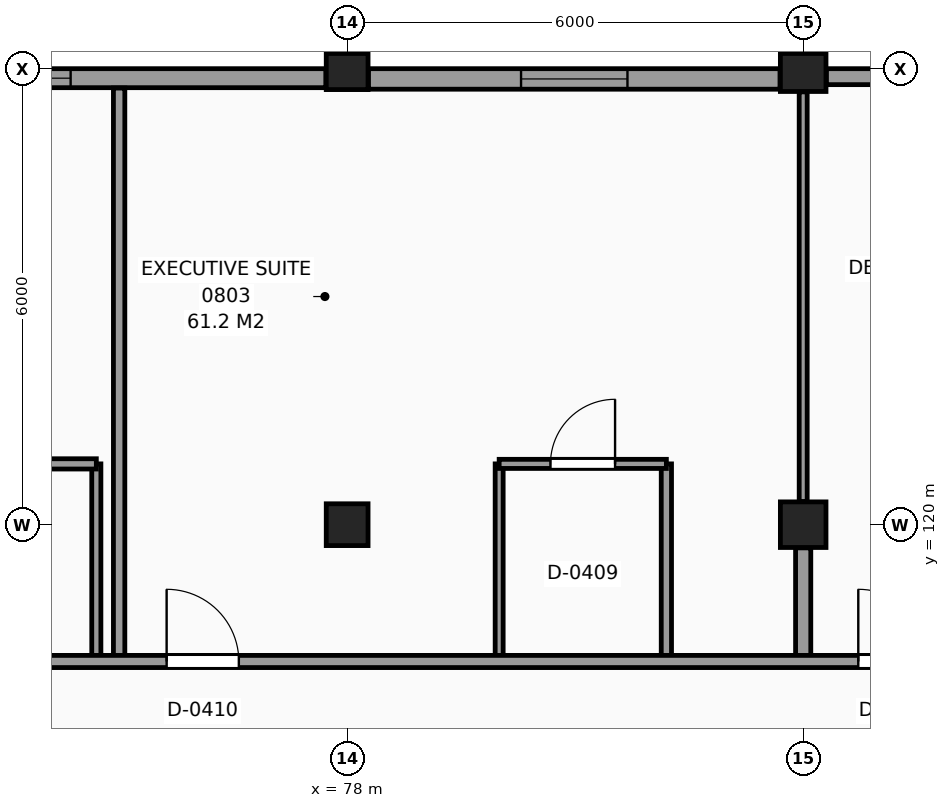
"""IFC4 building model, lengths in metres.
Left out: names, types, materials, properties, quantities, classifications, styles, units other than length and angle.
Written with IfcOpenShell. Run it as: python <this file> out.ifc"""

import sys

from ifc_helpers import new_model, si_unit, direction, frame, frame_2d, origin, origin_2d, place, context, subcontext, project, spatial, rectangle, extrude, element, fill, save


model = new_model("IFC4")
c1 = context("Model", 3, precision=1e-05, world=origin(), true_north=direction((0.0, 1.0)))
c2 = subcontext(c1, "Body", "Model", "MODEL_VIEW")
j1 = project(units=[si_unit("LENGTHUNIT", "METRE"), si_unit("PLANEANGLEUNIT", "RADIAN")], contexts=[c1])
p1 = place(None, origin())
s1 = spatial("IfcSite", under=j1, at=p1, CompositionType="ELEMENT")
p2 = place(p1, origin())
s2 = spatial("IfcBuilding", under=s1, at=p2, CompositionType="ELEMENT")
p3 = place(p2, frame((0.0, 0.0, 34.8)))
s3 = spatial("IfcBuildingStorey", under=s2, at=p3, CompositionType="ELEMENT", Elevation=34.8)
for number, where, z_axis, x_axis in (
    (1, (78.0, 120.0, 0.0), (0.0, 0.0, 1.0), (1.0, 0.0, 0.0)),
    (2, (78.0, 126.0, 0.0), (0.0, 0.0, 1.0), (1.0, 0.0, 0.0)),
):
    element("IfcColumn", number, at=place(p3, frame(where, z_axis=z_axis, x_axis=x_axis)), inside=s3, PredefinedType="COLUMN", context=c2, shape_type="SweptSolid", body=[
        extrude(rectangle(XDim=0.55, YDim=0.55, at=origin_2d()), origin(), (0.0, 0.0, 1.0), 3.3),
    ])
for number, where, z_axis, x_axis in (
    (3, (84.0, 120.0, 0.0), (0.0, 0.0, 1.0), (1.0, 0.0, 0.0)),
    (4, (84.0, 126.0, 0.0), (0.0, 0.0, 1.0), (1.0, 0.0, 0.0)),
):
    element("IfcColumn", number, at=place(p3, frame(where, z_axis=z_axis, x_axis=x_axis)), inside=s3, PredefinedType="COLUMN", context=c2, shape_type="SweptSolid", body=[
        extrude(rectangle(XDim=0.6, YDim=0.6, at=origin_2d()), origin(), (0.0, 0.0, 1.0), 3.3),
    ])
p4 = place(p3, frame((89.72, 125.895, 0.0), z_axis=(0.0, 0.0, 1.0), x_axis=(-1.0, 0.0, 0.0)))
e5 = element("IfcWall", 5, at=p4, inside=s3, PredefinedType="SOLIDWALL", context=c2, shape_type="SweptSolid", body=[
    extrude(rectangle(XDim=5.415, YDim=0.21, at=frame_2d((2.708, 0.0))), origin(), (0.0, 0.0, 1.0), 2.445),
])
p5 = place(p4, frame((2.608, 0.0, 0.8)))
e6 = element("IfcOpeningElement", 6, at=p5, cuts=e5, PredefinedType="OPENING", context=c2, shape_type="SweptSolid", body=[
    extrude(rectangle(XDim=1.4, YDim=1.4, at=frame_2d((0.7, 0.7))), frame((0.0, 0.115, 0.0), z_axis=(0.0, -1.0, 0.0), x_axis=(1.0, 0.0, 0.0)), (0.0, 0.0, 1.0), 0.23),
])
p6 = place(p3, frame((83.695, 125.865, 0.0), z_axis=(0.0, 0.0, 1.0), x_axis=(-1.0, 0.0, 0.0)))
e7 = element("IfcWall", 7, at=p6, inside=s3, PredefinedType="SOLIDWALL", context=c2, shape_type="SweptSolid", body=[
    extrude(rectangle(XDim=5.415, YDim=0.27, at=frame_2d((2.708, 0.0))), origin(), (0.0, 0.0, 1.0), 2.445),
])
p7 = place(p6, frame((2.007, 0.0, 0.8)))
e8 = element("IfcOpeningElement", 8, at=p7, cuts=e7, PredefinedType="OPENING", context=c2, shape_type="SweptSolid", body=[
    extrude(rectangle(XDim=1.4, YDim=1.4, at=frame_2d((0.7, 0.7))), frame((0.0, 0.145, 0.0), z_axis=(0.0, -1.0, 0.0), x_axis=(1.0, 0.0, 0.0)), (0.0, 0.0, 1.0), 0.29),
])
p8 = place(p3, frame((77.72, 125.875, 0.0), z_axis=(0.0, 0.0, 1.0), x_axis=(-1.0, 0.0, 0.0)))
e9 = element("IfcWall", 9, at=p8, inside=s3, PredefinedType="SOLIDWALL", context=c2, shape_type="SweptSolid", body=[
    extrude(rectangle(XDim=5.415, YDim=0.25, at=frame_2d((2.708, 0.0))), origin(), (0.0, 0.0, 1.0), 2.445),
])
p9 = place(p8, frame((3.358, 0.0, 0.8)))
e10 = element("IfcOpeningElement", 10, at=p9, cuts=e9, PredefinedType="OPENING", context=c2, shape_type="SweptSolid", body=[
    extrude(rectangle(XDim=1.4, YDim=1.4, at=frame_2d((0.7, 0.7))), frame((0.0, 0.135, 0.0), z_axis=(0.0, -1.0, 0.0), x_axis=(1.0, 0.0, 0.0)), (0.0, 0.0, 1.0), 0.27),
])
p10 = place(p3, frame((74.7, 118.2, 0.0), z_axis=(0.0, 0.0, 1.0), x_axis=(0.0, 1.0, 0.0)))
e11 = element("IfcWall", 11, at=p10, inside=s3, PredefinedType="PARTITIONING", context=c2, shape_type="SweptSolid", body=[
    extrude(rectangle(XDim=2.6, YDim=0.12, at=frame_2d((1.3, 0.0))), origin(), (0.0, 0.0, 1.0), 3.07),
])
p11 = place(p3, frame((75.0, 118.2, 0.0), z_axis=(0.0, 0.0, 1.0), x_axis=(0.0, 1.0, 0.0)))
e12 = element("IfcWall", 12, at=p11, inside=s3, PredefinedType="PARTITIONING", context=c2, shape_type="SweptSolid", body=[
    extrude(rectangle(XDim=7.545, YDim=0.15, at=frame_2d((3.772, 0.0))), origin(), (0.0, 0.0, 1.0), 3.07),
])
p12 = place(p3, frame((80.0, 118.2, 0.0), z_axis=(0.0, 0.0, 1.0), x_axis=(0.0, 1.0, 0.0)))
e13 = element("IfcWall", 13, at=p12, inside=s3, PredefinedType="PARTITIONING", context=c2, shape_type="SweptSolid", body=[
    extrude(rectangle(XDim=2.6, YDim=0.105, at=frame_2d((1.3, 0.0))), origin(), (0.0, 0.0, 1.0), 3.07),
])
p13 = place(p3, frame((82.2, 118.2, 0.0), z_axis=(0.0, 0.0, 1.0), x_axis=(0.0, 1.0, 0.0)))
e14 = element("IfcWall", 14, at=p13, inside=s3, PredefinedType="PARTITIONING", context=c2, shape_type="SweptSolid", body=[
    extrude(rectangle(XDim=2.6, YDim=0.135, at=frame_2d((1.3, 0.0))), origin(), (0.0, 0.0, 1.0), 3.07),
])
p14 = place(p3, frame((84.0, 118.2, 0.0), z_axis=(0.0, 0.0, 1.0), x_axis=(0.0, 1.0, 0.0)))
e15 = element("IfcWall", 15, at=p14, inside=s3, PredefinedType="PARTITIONING", context=c2, shape_type="SweptSolid", body=[
    extrude(rectangle(XDim=1.495, YDim=0.2, at=frame_2d((0.748, 0.0))), origin(), (0.0, 0.0, 1.0), 2.295),
])
p15 = place(p3, frame((84.0, 120.305, 0.0), z_axis=(0.0, 0.0, 1.0), x_axis=(0.0, 1.0, 0.0)))
e16 = element("IfcWall", 16, at=p15, inside=s3, PredefinedType="PARTITIONING", context=c2, shape_type="SweptSolid", body=[
    extrude(rectangle(XDim=5.39, YDim=0.105, at=frame_2d((2.695, 0.0))), origin(), (0.0, 0.0, 1.0), 2.295),
])
p16 = place(p3, frame((66.275, 118.2, 0.0), z_axis=(0.0, 0.0, 1.0), x_axis=(1.0, 0.0, 0.0)))
e17 = element("IfcWall", 17, at=p16, inside=s3, PredefinedType="PARTITIONING", context=c2, shape_type="SweptSolid", body=[
    extrude(rectangle(XDim=110.225, YDim=0.16, at=frame_2d((55.113, 0.0))), origin(), (0.0, 0.0, 1.0), 3.07),
])
p17 = place(p16, frame((0.45, 0.0, 0.0)))
e18 = element("IfcOpeningElement", 18, at=p17, cuts=e17, PredefinedType="OPENING", context=c2, shape_type="SweptSolid", body=[
    extrude(rectangle(XDim=0.95, YDim=2.1, at=frame_2d((0.475, 1.05))), frame((0.0, 0.09, 0.0), z_axis=(0.0, -1.0, 0.0), x_axis=(1.0, 0.0, 0.0)), (0.0, 0.0, 1.0), 0.18),
])
p18 = place(p16, frame((4.85, 0.0, 0.0)))
e19 = element("IfcOpeningElement", 19, at=p18, cuts=e17, PredefinedType="OPENING", context=c2, shape_type="SweptSolid", body=[
    extrude(rectangle(XDim=0.95, YDim=2.1, at=frame_2d((0.475, 1.05))), frame((0.0, 0.09, 0.0), z_axis=(0.0, -1.0, 0.0), x_axis=(1.0, 0.0, 0.0)), (0.0, 0.0, 1.0), 0.18),
])
p19 = place(p16, frame((9.35, 0.0, 0.0)))
e20 = element("IfcOpeningElement", 20, at=p19, cuts=e17, PredefinedType="OPENING", context=c2, shape_type="SweptSolid", body=[
    extrude(rectangle(XDim=0.95, YDim=2.1, at=frame_2d((0.475, 1.05))), frame((0.0, 0.09, 0.0), z_axis=(0.0, -1.0, 0.0), x_axis=(1.0, 0.0, 0.0)), (0.0, 0.0, 1.0), 0.18),
])
p20 = place(p16, frame((18.45, 0.0, 0.0)))
e21 = element("IfcOpeningElement", 21, at=p20, cuts=e17, PredefinedType="OPENING", context=c2, shape_type="SweptSolid", body=[
    extrude(rectangle(XDim=0.95, YDim=2.1, at=frame_2d((0.475, 1.05))), frame((0.0, 0.09, 0.0), z_axis=(0.0, -1.0, 0.0), x_axis=(1.0, 0.0, 0.0)), (0.0, 0.0, 1.0), 0.18),
])
p21 = place(p16, frame((22.85, 0.0, 0.0)))
e22 = element("IfcOpeningElement", 22, at=p21, cuts=e17, PredefinedType="OPENING", context=c2, shape_type="SweptSolid", body=[
    extrude(rectangle(XDim=0.95, YDim=2.1, at=frame_2d((0.475, 1.05))), frame((0.0, 0.09, 0.0), z_axis=(0.0, -1.0, 0.0), x_axis=(1.0, 0.0, 0.0)), (0.0, 0.0, 1.0), 0.18),
])
p22 = place(p16, frame((27.35, 0.0, 0.0)))
e23 = element("IfcOpeningElement", 23, at=p22, cuts=e17, PredefinedType="OPENING", context=c2, shape_type="SweptSolid", body=[
    extrude(rectangle(XDim=0.95, YDim=2.1, at=frame_2d((0.475, 1.05))), frame((0.0, 0.09, 0.0), z_axis=(0.0, -1.0, 0.0), x_axis=(1.0, 0.0, 0.0)), (0.0, 0.0, 1.0), 0.18),
])
p23 = place(p16, frame((42.05, 0.0, 0.0)))
e24 = element("IfcOpeningElement", 24, at=p23, cuts=e17, PredefinedType="OPENING", context=c2, shape_type="SweptSolid", body=[
    extrude(rectangle(XDim=0.95, YDim=2.1, at=frame_2d((0.475, 1.05))), frame((0.0, 0.09, 0.0), z_axis=(0.0, -1.0, 0.0), x_axis=(1.0, 0.0, 0.0)), (0.0, 0.0, 1.0), 0.18),
])
p24 = place(p16, frame((50.3, 0.0, 0.0)))
e25 = element("IfcOpeningElement", 25, at=p24, cuts=e17, PredefinedType="OPENING", context=c2, shape_type="SweptSolid", body=[
    extrude(rectangle(XDim=0.95, YDim=2.1, at=frame_2d((0.475, 1.05))), frame((0.0, 0.09, 0.0), z_axis=(0.0, -1.0, 0.0), x_axis=(1.0, 0.0, 0.0)), (0.0, 0.0, 1.0), 0.18),
])
p25 = place(p16, frame((52.85, 0.0, 0.0)))
e26 = element("IfcOpeningElement", 26, at=p25, cuts=e17, PredefinedType="OPENING", context=c2, shape_type="SweptSolid", body=[
    extrude(rectangle(XDim=0.95, YDim=2.1, at=frame_2d((0.475, 1.05))), frame((0.0, 0.09, 0.0), z_axis=(0.0, -1.0, 0.0), x_axis=(1.0, 0.0, 0.0)), (0.0, 0.0, 1.0), 0.18),
])
p26 = place(p16, frame((60.05, 0.0, 0.0)))
e27 = element("IfcOpeningElement", 27, at=p26, cuts=e17, PredefinedType="OPENING", context=c2, shape_type="SweptSolid", body=[
    extrude(rectangle(XDim=0.95, YDim=2.1, at=frame_2d((0.475, 1.05))), frame((0.0, 0.09, 0.0), z_axis=(0.0, -1.0, 0.0), x_axis=(1.0, 0.0, 0.0)), (0.0, 0.0, 1.0), 0.18),
])
p27 = place(p16, frame((64.25, 0.0, 0.0)))
e28 = element("IfcOpeningElement", 28, at=p27, cuts=e17, PredefinedType="OPENING", context=c2, shape_type="SweptSolid", body=[
    extrude(rectangle(XDim=0.95, YDim=2.1, at=frame_2d((0.475, 1.05))), frame((0.0, 0.09, 0.0), z_axis=(0.0, -1.0, 0.0), x_axis=(1.0, 0.0, 0.0)), (0.0, 0.0, 1.0), 0.18),
])
p28 = place(p16, frame((66.45, 0.0, 0.0)))
e29 = element("IfcOpeningElement", 29, at=p28, cuts=e17, PredefinedType="OPENING", context=c2, shape_type="SweptSolid", body=[
    extrude(rectangle(XDim=0.95, YDim=2.1, at=frame_2d((0.475, 1.05))), frame((0.0, 0.09, 0.0), z_axis=(0.0, -1.0, 0.0), x_axis=(1.0, 0.0, 0.0)), (0.0, 0.0, 1.0), 0.18),
])
p29 = place(p16, frame((72.45, 0.0, 0.0)))
e30 = element("IfcOpeningElement", 30, at=p29, cuts=e17, PredefinedType="OPENING", context=c2, shape_type="SweptSolid", body=[
    extrude(rectangle(XDim=0.95, YDim=2.1, at=frame_2d((0.475, 1.05))), frame((0.0, 0.09, 0.0), z_axis=(0.0, -1.0, 0.0), x_axis=(1.0, 0.0, 0.0)), (0.0, 0.0, 1.0), 0.18),
])
p30 = place(p16, frame((82.25, 0.0, 0.0)))
e31 = element("IfcOpeningElement", 31, at=p30, cuts=e17, PredefinedType="OPENING", context=c2, shape_type="SweptSolid", body=[
    extrude(rectangle(XDim=0.95, YDim=2.1, at=frame_2d((0.475, 1.05))), frame((0.0, 0.09, 0.0), z_axis=(0.0, -1.0, 0.0), x_axis=(1.0, 0.0, 0.0)), (0.0, 0.0, 1.0), 0.18),
])
p31 = place(p16, frame((84.45, 0.0, 0.0)))
e32 = element("IfcOpeningElement", 32, at=p31, cuts=e17, PredefinedType="OPENING", context=c2, shape_type="SweptSolid", body=[
    extrude(rectangle(XDim=0.95, YDim=2.1, at=frame_2d((0.475, 1.05))), frame((0.0, 0.09, 0.0), z_axis=(0.0, -1.0, 0.0), x_axis=(1.0, 0.0, 0.0)), (0.0, 0.0, 1.0), 0.18),
])
p32 = place(p16, frame((88.85, 0.0, 0.0)))
e33 = element("IfcOpeningElement", 33, at=p32, cuts=e17, PredefinedType="OPENING", context=c2, shape_type="SweptSolid", body=[
    extrude(rectangle(XDim=0.95, YDim=2.1, at=frame_2d((0.475, 1.05))), frame((0.0, 0.09, 0.0), z_axis=(0.0, -1.0, 0.0), x_axis=(1.0, 0.0, 0.0)), (0.0, 0.0, 1.0), 0.18),
])
p33 = place(p16, frame((96.05, 0.0, 0.0)))
e34 = element("IfcOpeningElement", 34, at=p33, cuts=e17, PredefinedType="OPENING", context=c2, shape_type="SweptSolid", body=[
    extrude(rectangle(XDim=0.95, YDim=2.1, at=frame_2d((0.475, 1.05))), frame((0.0, 0.09, 0.0), z_axis=(0.0, -1.0, 0.0), x_axis=(1.0, 0.0, 0.0)), (0.0, 0.0, 1.0), 0.18),
])
p34 = place(p16, frame((104.3, 0.0, 0.0)))
e35 = element("IfcOpeningElement", 35, at=p34, cuts=e17, PredefinedType="OPENING", context=c2, shape_type="SweptSolid", body=[
    extrude(rectangle(XDim=0.95, YDim=2.1, at=frame_2d((0.475, 1.05))), frame((0.0, 0.09, 0.0), z_axis=(0.0, -1.0, 0.0), x_axis=(1.0, 0.0, 0.0)), (0.0, 0.0, 1.0), 0.18),
])
p35 = place(p16, frame((108.45, 0.0, 0.0)))
e36 = element("IfcOpeningElement", 36, at=p35, cuts=e17, PredefinedType="OPENING", context=c2, shape_type="SweptSolid", body=[
    extrude(rectangle(XDim=0.95, YDim=2.1, at=frame_2d((0.475, 1.05))), frame((0.0, 0.09, 0.0), z_axis=(0.0, -1.0, 0.0), x_axis=(1.0, 0.0, 0.0)), (0.0, 0.0, 1.0), 0.18),
])
p36 = place(p3, frame((72.5, 120.8, 0.0), z_axis=(0.0, 0.0, 1.0), x_axis=(1.0, 0.0, 0.0)))
e37 = element("IfcWall", 37, at=p36, inside=s3, PredefinedType="PARTITIONING", context=c2, shape_type="SweptSolid", body=[
    extrude(rectangle(XDim=2.2, YDim=0.135, at=frame_2d((1.1, 0.0))), origin(), (0.0, 0.0, 1.0), 3.07),
])
p37 = place(p36, frame((0.675, 0.0, 0.0)))
e38 = element("IfcOpeningElement", 38, at=p37, cuts=e37, PredefinedType="OPENING", context=c2, shape_type="SweptSolid", body=[
    extrude(rectangle(XDim=0.85, YDim=2.1, at=frame_2d((0.425, 1.05))), frame((0.0, 0.078, 0.0), z_axis=(0.0, -1.0, 0.0), x_axis=(1.0, 0.0, 0.0)), (0.0, 0.0, 1.0), 0.155),
])
p38 = place(p3, frame((80.0, 120.8, 0.0), z_axis=(0.0, 0.0, 1.0), x_axis=(1.0, 0.0, 0.0)))
e39 = element("IfcWall", 39, at=p38, inside=s3, PredefinedType="PARTITIONING", context=c2, shape_type="SweptSolid", body=[
    extrude(rectangle(XDim=2.2, YDim=0.12, at=frame_2d((1.1, 0.0))), origin(), (0.0, 0.0, 1.0), 3.07),
])
p39 = place(p38, frame((0.675, 0.0, 0.0)))
e40 = element("IfcOpeningElement", 40, at=p39, cuts=e39, PredefinedType="OPENING", context=c2, shape_type="SweptSolid", body=[
    extrude(rectangle(XDim=0.85, YDim=2.1, at=frame_2d((0.425, 1.05))), frame((0.0, 0.07, 0.0), z_axis=(0.0, -1.0, 0.0), x_axis=(1.0, 0.0, 0.0)), (0.0, 0.0, 1.0), 0.14),
])
p40 = place(p9, origin())
e41 = element("IfcWindow", 41, at=p40, inside=s3, PartitioningType="SINGLE_PANEL", PredefinedType="WINDOW", context=c2, shape_type="SweptSolid", body=[
    extrude(rectangle(XDim=1.4, YDim=1.4, at=frame_2d((0.7, 0.7))), frame((0.0, 0.03, 0.0), z_axis=(0.0, -1.0, 0.0), x_axis=(1.0, 0.0, 0.0)), (0.0, 0.0, 1.0), 0.06),
])
fill(e10, e41)
p41 = place(p7, origin())
e42 = element("IfcWindow", 42, at=p41, inside=s3, PartitioningType="SINGLE_PANEL", PredefinedType="WINDOW", context=c2, shape_type="SweptSolid", body=[
    extrude(rectangle(XDim=1.4, YDim=1.4, at=frame_2d((0.7, 0.7))), frame((0.0, 0.03, 0.0), z_axis=(0.0, -1.0, 0.0), x_axis=(1.0, 0.0, 0.0)), (0.0, 0.0, 1.0), 0.06),
])
fill(e8, e42)
p42 = place(p39, origin())
e43 = element("IfcDoor", 43, at=p42, inside=s3, OperationType="SINGLE_SWING_RIGHT", PredefinedType="DOOR", context=c2, shape_type="SweptSolid", body=[
    extrude(rectangle(XDim=0.85, YDim=2.1, at=frame_2d((0.425, 1.05))), frame((0.0, 0.025, 0.0), z_axis=(0.0, -1.0, 0.0), x_axis=(1.0, 0.0, 0.0)), (0.0, 0.0, 1.0), 0.05),
])
fill(e40, e43)
p43 = place(p19, origin())
e44 = element("IfcDoor", 44, at=p43, inside=s3, OperationType="SINGLE_SWING_LEFT", PredefinedType="DOOR", context=c2, shape_type="SweptSolid", body=[
    extrude(rectangle(XDim=0.95, YDim=2.1, at=frame_2d((0.475, 1.05))), frame((0.0, 0.025, 0.0), z_axis=(0.0, -1.0, 0.0), x_axis=(1.0, 0.0, 0.0)), (0.0, 0.0, 1.0), 0.05),
])
fill(e20, e44)
p44 = place(p20, origin())
e45 = element("IfcDoor", 45, at=p44, inside=s3, OperationType="SINGLE_SWING_LEFT", PredefinedType="DOOR", context=c2, shape_type="SweptSolid", body=[
    extrude(rectangle(XDim=0.95, YDim=2.1, at=frame_2d((0.475, 1.05))), frame((0.0, 0.025, 0.0), z_axis=(0.0, -1.0, 0.0), x_axis=(1.0, 0.0, 0.0)), (0.0, 0.0, 1.0), 0.05),
])
fill(e21, e45)
save(model, sys.argv[1])
